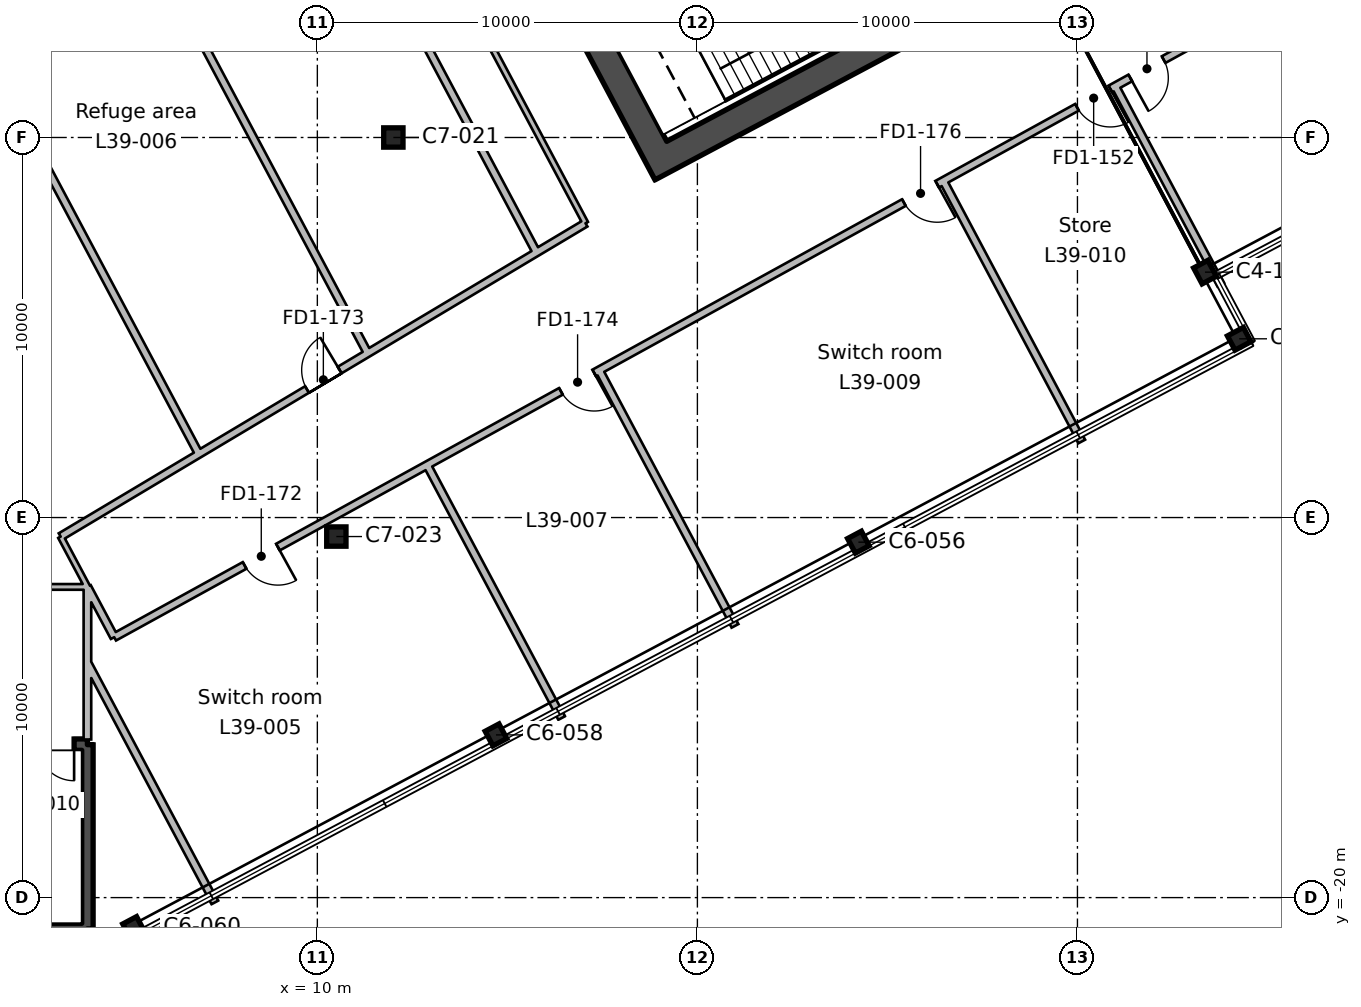
"""IFC4 building model, lengths in metres.
Left out: names, types, materials, properties, quantities, classifications, styles, units other than length and angle.
Written with IfcOpenShell. Run it as: python <this file> out.ifc"""

import sys

from ifc_helpers import new_model, si_unit, direction, frame, frame_2d, origin, origin_2d, place, context, subcontext, project, spatial, rectangle, hollow_rectangle, i_section, extrude, element, fill, save


model = new_model("IFC4")
c1 = context("Model", 3, precision=1e-05, world=origin(), true_north=direction((0.0, 1.0)))
c2 = subcontext(c1, "Body", "Model", "MODEL_VIEW")
j1 = project(units=[si_unit("LENGTHUNIT", "METRE"), si_unit("PLANEANGLEUNIT", "RADIAN")], contexts=[c1])
p1 = place(None, origin())
s1 = spatial("IfcSite", under=j1, at=p1, CompositionType="ELEMENT")
p2 = place(p1, origin())
s2 = spatial("IfcBuilding", under=s1, at=p2, CompositionType="ELEMENT")
p3 = place(p2, frame((0.0, 0.0, 183.6)))
s3 = spatial("IfcBuildingStorey", under=s2, at=p3, CompositionType="ELEMENT", Elevation=183.6)
for number, where, z_axis, x_axis in (
    (1, (5.164, -20.789, 0.0), (0.0, 0.0, 1.0), (0.883, 0.469, 0.0)),
    (2, (14.7, -15.719, 0.0), (0.0, 0.0, 1.0), (0.883, 0.469, 0.0)),
    (3, (24.236, -10.648, 0.0), (0.0, 0.0, 1.0), (0.883, 0.469, 0.0)),
):
    element("IfcColumn", number, at=place(p3, frame(where, z_axis=z_axis, x_axis=x_axis)), inside=s3, PredefinedType="COLUMN", context=c2, shape_type="SweptSolid", body=[
        extrude(i_section(OverallWidth=0.412, OverallDepth=0.434, WebThickness=0.036, FlangeThickness=0.057, FilletRadius=0.015, at=origin_2d()), origin(), (0.0, 0.0, 1.0), 6.0),
    ])
p4 = place(p3, frame((10.5, -10.5, 0.0), z_axis=(0.0, 0.0, 1.0), x_axis=(1.0, 0.0, 0.0)))
e4 = element("IfcColumn", 4, at=p4, inside=s3, PredefinedType="COLUMN", context=c2, shape_type="SweptSolid", body=[
    extrude(hollow_rectangle(XDim=0.508, YDim=0.508, WallThickness=0.012, InnerFilletRadius=0.006, OuterFilletRadius=0.018, at=origin_2d()), origin(), (0.0, 0.0, 1.0), 6.0),
])
for number, where, z_axis, x_axis in (
    (5, (34.256, -5.297, 0.0), (0.0, 0.0, 1.0), (-0.469, 0.883, 0.0)),
    (6, (33.356, -3.543, 0.0), (0.0, 0.0, 1.0), (0.883, 0.469, 0.0)),
):
    element("IfcColumn", number, at=place(p3, frame(where, z_axis=z_axis, x_axis=x_axis)), inside=s3, PredefinedType="COLUMN", context=c2, shape_type="SweptSolid", body=[
        extrude(i_section(OverallWidth=0.424, OverallDepth=0.475, WebThickness=0.048, FlangeThickness=0.077, FilletRadius=0.015, at=origin_2d()), origin(), (0.0, 0.0, 1.0), 6.0),
    ])
p5 = place(p3, frame((12.0, 0.0, 0.0), z_axis=(0.0, 0.0, 1.0), x_axis=(1.0, 0.0, 0.0)))
e7 = element("IfcColumn", 7, at=p5, inside=s3, PredefinedType="COLUMN", context=c2, shape_type="SweptSolid", body=[
    extrude(hollow_rectangle(XDim=0.508, YDim=0.508, WallThickness=0.012, InnerFilletRadius=0.006, OuterFilletRadius=0.018, at=origin_2d()), origin(), (0.0, 0.0, 1.0), 6.0),
])
p6 = place(p3, frame((19.215, -0.939, 0.0), z_axis=(0.0, 0.0, 1.0), x_axis=(-0.469479580143, 0.882943329908, 0.0)))
e8 = element("IfcWall", 8, at=p6, inside=s3, PredefinedType="SHEAR", context=c2, shape_type="SweptSolid", body=[
    extrude(rectangle(XDim=19.7, YDim=0.75, at=frame_2d((9.85, 0.0))), origin(), (0.0, 0.0, 1.0), 6.0),
])
p7 = place(p6, frame((6.85, 0.0, 0.0)))
e9 = element("IfcOpeningElement", 9, at=p7, cuts=e8, PredefinedType="OPENING", context=c2, shape_type="SweptSolid", body=[
    extrude(rectangle(XDim=2.4, YDim=2.4, at=frame_2d((1.2, 1.2))), frame((0.0, 0.385, 0.0), z_axis=(0.0, -1.0, 0.0), x_axis=(1.0, 0.0, 0.0)), (0.0, 0.0, 1.0), 0.77),
])
p8 = place(p3, frame((19.37, -0.432, 0.0), z_axis=(0.0, 0.0, 1.0), x_axis=(0.88294509198, 0.469476266226, 0.0)))
e10 = element("IfcWall", 10, at=p8, inside=s3, PredefinedType="SHEAR", context=c2, shape_type="SweptSolid", body=[
    extrude(rectangle(XDim=20.2, YDim=0.75, at=frame_2d((10.1, 0.0))), origin(), (0.0, 0.0, 1.0), 6.0),
])
p9 = place(p3, frame((3.95, -15.975, 0.0), z_axis=(0.0, 0.0, 1.0), x_axis=(0.0, -1.0, 0.0)))
e11 = element("IfcWall", 11, at=p9, inside=s3, PredefinedType="SHEAR", context=c2, shape_type="SweptSolid", body=[
    extrude(rectangle(XDim=4.85, YDim=0.3, at=frame_2d((2.425, 0.0))), origin(), (0.0, 0.0, 1.0), 6.0),
])
p10 = place(p3, frame((3.95, -20.825, 0.0), z_axis=(0.0, 0.0, 1.0), x_axis=(-1.0, 0.0, 0.0)))
e12 = element("IfcWall", 12, at=p10, inside=s3, PredefinedType="SHEAR", context=c2, shape_type="SweptSolid", body=[
    extrude(rectangle(XDim=8.3, YDim=0.3, at=frame_2d((4.15, 0.0))), origin(), (0.0, 0.0, 1.0), 6.0),
])
p11 = place(p3, frame((-4.35, -15.975, 0.0), z_axis=(0.0, 0.0, 1.0), x_axis=(1.0, 0.0, 0.0)))
e13 = element("IfcWall", 13, at=p11, inside=s3, PredefinedType="SHEAR", context=c2, shape_type="SweptSolid", body=[
    extrude(rectangle(XDim=8.3, YDim=0.3, at=frame_2d((4.15, 0.0))), origin(), (0.0, 0.0, 1.0), 6.0),
])
p12 = place(p11, frame((6.05, 0.0, 0.0)))
e14 = element("IfcOpeningElement", 14, at=p12, cuts=e13, PredefinedType="OPENING", context=c2, shape_type="SweptSolid", body=[
    extrude(rectangle(XDim=1.9, YDim=2.1, at=frame_2d((0.95, 1.05))), frame((0.0, 0.16, 0.0), z_axis=(0.0, -1.0, 0.0), x_axis=(1.0, 0.0, 0.0)), (0.0, 0.0, 1.0), 0.32),
])
p13 = place(p3, frame((3.184, 9.632, 0.0), z_axis=(0.0, 0.0, 1.0), x_axis=(0.469488044355, -0.882938829256, 0.0)))
e15 = element("IfcWall", 15, at=p13, inside=s3, PredefinedType="PARTITIONING", context=c2, shape_type="SweptSolid", body=[
    extrude(rectangle(XDim=17.34, YDim=0.2, at=frame_2d((8.67, 0.0))), origin(), (0.0, 0.0, 1.0), 5.55),
])
p14 = place(p3, frame((6.883, -8.329, 0.0), z_axis=(0.0, 0.0, 1.0), x_axis=(-0.469431608927, 0.882968835543, 0.0)))
e16 = element("IfcWall", 16, at=p14, inside=s3, PredefinedType="PARTITIONING", context=c2, shape_type="SweptSolid", body=[
    extrude(rectangle(XDim=9.02, YDim=0.2, at=frame_2d((4.51, 0.0))), origin(), (0.0, 0.0, 1.0), 5.55),
])
p15 = place(p3, frame((2.647, -11.825, 0.0), z_axis=(0.0, 0.0, 1.0), x_axis=(1.0, 0.0, 0.0)))
e17 = element("IfcWall", 17, at=p15, inside=s3, PredefinedType="PARTITIONING", context=c2, shape_type="SweptSolid", body=[
    extrude(rectangle(XDim=1.303, YDim=0.15, at=frame_2d((0.651, 0.0))), origin(), (0.0, 0.0, 1.0), 5.55),
])
p16 = place(p3, frame((3.95, -11.825, 0.0), z_axis=(0.0, 0.0, 1.0), x_axis=(0.0, -1.0, 0.0)))
e18 = element("IfcWall", 18, at=p16, inside=s3, PredefinedType="PARTITIONING", context=c2, shape_type="SweptSolid", body=[
    extrude(rectangle(XDim=4.015, YDim=0.2, at=frame_2d((2.008, 0.0))), origin(), (0.0, 0.0, 1.0), 5.55),
])
p17 = place(p3, frame((6.812, 13.814, 0.0), z_axis=(0.0, 0.0, 1.0), x_axis=(0.46951956429, -0.882922068333, 0.0)))
e19 = element("IfcWall", 19, at=p17, inside=s3, PredefinedType="PARTITIONING", context=c2, shape_type="SweptSolid", body=[
    extrude(rectangle(XDim=19.073, YDim=0.2, at=frame_2d((9.536, 0.0))), origin(), (0.0, 0.0, 1.0), 5.55),
])
p18 = place(p3, frame((3.951, -11.827, 0.0), z_axis=(0.0, 0.0, 1.0), x_axis=(-0.469381070395, 0.882995702569, 0.0)))
e20 = element("IfcWall", 20, at=p18, inside=s3, PredefinedType="PARTITIONING", context=c2, shape_type="SweptSolid", body=[
    extrude(rectangle(XDim=1.502, YDim=0.15, at=frame_2d((0.751, 0.0))), origin(), (0.0, 0.0, 1.0), 5.55),
])
p19 = place(p3, frame((3.246, -10.501, 0.0), z_axis=(0.0, 0.0, 1.0), x_axis=(0.858642651925, 0.512574673872, 0.0)))
e21 = element("IfcWall", 21, at=p19, inside=s3, PredefinedType="PARTITIONING", context=c2, shape_type="SweptSolid", body=[
    extrude(rectangle(XDim=16.083, YDim=0.2, at=frame_2d((8.042, 0.0))), origin(), (0.0, 0.0, 1.0), 5.55),
])
p20 = place(p19, frame((7.55, 0.0, 0.0)))
e22 = element("IfcOpeningElement", 22, at=p20, cuts=e21, PredefinedType="OPENING", context=c2, shape_type="SweptSolid", body=[
    extrude(rectangle(XDim=1.0, YDim=2.1, at=frame_2d((0.5, 1.05))), frame((0.0, 0.11, 0.0), z_axis=(0.0, -1.0, 0.0), x_axis=(1.0, 0.0, 0.0)), (0.0, 0.0, 1.0), 0.22),
])
p21 = place(p3, frame((17.056, -2.257, 0.0), z_axis=(0.0, 0.0, 1.0), x_axis=(-0.469446756585, 0.882960782103, 0.0)))
e23 = element("IfcWall", 23, at=p21, inside=s3, PredefinedType="PARTITIONING", context=c2, shape_type="SweptSolid", body=[
    extrude(rectangle(XDim=20.0, YDim=0.15, at=frame_2d((10.0, 0.0))), origin(), (0.0, 0.0, 1.0), 5.55),
])
p22 = place(p3, frame((7.304, -20.127, 0.0), z_axis=(0.0, 0.0, 1.0), x_axis=(-0.469420857785, 0.882974551319, 0.0)))
e24 = element("IfcWall", 24, at=p22, inside=s3, PredefinedType="PARTITIONING", context=c2, shape_type="SweptSolid", body=[
    extrude(rectangle(XDim=7.145, YDim=0.2, at=frame_2d((3.573, 0.0))), origin(), (0.0, 0.0, 1.0), 5.55),
])
p23 = place(p3, frame((12.424, -8.873, 0.0), z_axis=(0.0, 0.0, 1.0), x_axis=(-0.876103131237, -0.482123742867, 0.0)))
e25 = element("IfcWall", 25, at=p23, inside=s3, PredefinedType="PARTITIONING", context=c2, shape_type="SweptSolid", body=[
    extrude(rectangle(XDim=8.869, YDim=0.2, at=frame_2d((4.435, 0.0))), origin(), (0.0, 0.0, 1.0), 5.55),
])
p24 = place(p23, frame((3.951, 0.0, 0.0)))
e26 = element("IfcOpeningElement", 26, at=p24, cuts=e25, PredefinedType="OPENING", context=c2, shape_type="SweptSolid", body=[
    extrude(rectangle(XDim=1.0, YDim=2.1, at=frame_2d((0.5, 1.05))), frame((0.0, 0.11, 0.0), z_axis=(0.0, -1.0, 0.0), x_axis=(1.0, 0.0, 0.0)), (0.0, 0.0, 1.0), 0.22),
])
p25 = place(p3, frame((3.951, -11.827, 0.0), z_axis=(0.0, 0.0, 1.0), x_axis=(0.470080557323, -0.882623515224, 0.0)))
e27 = element("IfcWall", 27, at=p25, inside=s3, PredefinedType="PARTITIONING", context=c2, shape_type="SweptSolid", body=[
    extrude(rectangle(XDim=1.498, YDim=0.2, at=frame_2d((0.749, 0.0))), origin(), (0.0, 0.0, 1.0), 5.55),
])
p26 = place(p3, frame((12.888, -8.617, 0.0), z_axis=(0.0, 0.0, 1.0), x_axis=(0.469566260547, -0.882897234652, 0.0)))
e28 = element("IfcWall", 28, at=p26, inside=s3, PredefinedType="PARTITIONING", context=c2, shape_type="SweptSolid", body=[
    extrude(rectangle(XDim=7.541, YDim=0.2, at=frame_2d((3.771, 0.0))), origin(), (0.0, 0.0, 1.0), 5.55),
])
p27 = place(p3, frame((48.518, 10.994, 0.0), z_axis=(0.0, 0.0, 1.0), x_axis=(-0.876059599613, -0.482202838986, 0.0)))
e29 = element("IfcWall", 29, at=p27, inside=s3, PredefinedType="PARTITIONING", context=c2, shape_type="SweptSolid", body=[
    extrude(rectangle(XDim=41.2, YDim=0.2, at=frame_2d((20.6, 0.0))), origin(), (0.0, 0.0, 1.0), 5.55),
])
p28 = place(p27, frame((35.651, 0.0, 0.0)))
e30 = element("IfcOpeningElement", 30, at=p28, cuts=e29, PredefinedType="OPENING", context=c2, shape_type="SweptSolid", body=[
    extrude(rectangle(XDim=1.0, YDim=2.1, at=frame_2d((0.5, 1.05))), frame((0.0, 0.11, 0.0), z_axis=(0.0, -1.0, 0.0), x_axis=(1.0, 0.0, 0.0)), (0.0, 0.0, 1.0), 0.22),
])
p29 = place(p27, frame((25.35, 0.0, 0.0)))
e31 = element("IfcOpeningElement", 31, at=p29, cuts=e29, PredefinedType="OPENING", context=c2, shape_type="SweptSolid", body=[
    extrude(rectangle(XDim=1.0, YDim=2.1, at=frame_2d((0.5, 1.05))), frame((0.0, 0.11, 0.0), z_axis=(0.0, -1.0, 0.0), x_axis=(1.0, 0.0, 0.0)), (0.0, 0.0, 1.0), 0.22),
])
p30 = place(p27, frame((20.151, 0.0, 0.0)))
e32 = element("IfcOpeningElement", 32, at=p30, cuts=e29, PredefinedType="OPENING", context=c2, shape_type="SweptSolid", body=[
    extrude(rectangle(XDim=1.0, YDim=2.1, at=frame_2d((0.5, 1.05))), frame((0.0, 0.11, 0.0), z_axis=(0.0, -1.0, 0.0), x_axis=(1.0, 0.0, 0.0)), (0.0, 0.0, 1.0), 0.22),
])
p31 = place(p27, frame((18.55, 0.0, 0.0)))
e33 = element("IfcOpeningElement", 33, at=p31, cuts=e29, PredefinedType="OPENING", context=c2, shape_type="SweptSolid", body=[
    extrude(rectangle(XDim=1.0, YDim=2.1, at=frame_2d((0.5, 1.05))), frame((0.0, 0.11, 0.0), z_axis=(0.0, -1.0, 0.0), x_axis=(1.0, 0.0, 0.0)), (0.0, 0.0, 1.0), 0.22),
])
p32 = place(p3, frame((17.415, -6.126, 0.0), z_axis=(0.0, 0.0, 1.0), x_axis=(0.46943804269, -0.882965414994, 0.0)))
e34 = element("IfcWall", 34, at=p32, inside=s3, PredefinedType="PARTITIONING", context=c2, shape_type="SweptSolid", body=[
    extrude(rectangle(XDim=7.615, YDim=0.2, at=frame_2d((3.808, 0.0))), origin(), (0.0, 0.0, 1.0), 5.55),
])
p33 = place(p3, frame((26.468, -1.143, 0.0), z_axis=(0.0, 0.0, 1.0), x_axis=(0.469435669849, -0.882966676536, 0.0)))
e35 = element("IfcWall", 35, at=p33, inside=s3, PredefinedType="PARTITIONING", context=c2, shape_type="SweptSolid", body=[
    extrude(rectangle(XDim=7.765, YDim=0.2, at=frame_2d((3.882, 0.0))), origin(), (0.0, 0.0, 1.0), 5.55),
])
p34 = place(p3, frame((30.995, 1.349, 0.0), z_axis=(0.0, 0.0, 1.0), x_axis=(0.469470734434, -0.882948033301, 0.0)))
e36 = element("IfcWall", 36, at=p34, inside=s3, PredefinedType="PARTITIONING", context=c2, shape_type="SweptSolid", body=[
    extrude(rectangle(XDim=5.921, YDim=0.2, at=frame_2d((2.96, 0.0))), origin(), (0.0, 0.0, 1.0), 5.55),
])
p35 = place(p12, frame((1.9, 0.0, 0.0), z_axis=(0.0, 0.0, 1.0), x_axis=(-1.0, 0.0, 0.0)))
e37 = element("IfcDoor", 37, at=p35, inside=s3, OperationType="DOUBLE_DOOR_SINGLE_SWING", PredefinedType="DOOR", context=c2, shape_type="SweptSolid", body=[
    extrude(rectangle(XDim=1.9, YDim=2.1, at=frame_2d((0.95, 1.05))), frame((0.0, 0.025, 0.0), z_axis=(0.0, -1.0, 0.0), x_axis=(1.0, 0.0, 0.0)), (0.0, 0.0, 1.0), 0.05),
])
fill(e14, e37)
p36 = place(p24, origin())
e38 = element("IfcDoor", 38, at=p36, inside=s3, OperationType="SINGLE_SWING_LEFT", PredefinedType="DOOR", context=c2, shape_type="SweptSolid", body=[
    extrude(rectangle(XDim=1.0, YDim=2.1, at=frame_2d((0.5, 1.05))), frame((0.0, 0.025, 0.0), z_axis=(0.0, -1.0, 0.0), x_axis=(1.0, 0.0, 0.0)), (0.0, 0.0, 1.0), 0.05),
])
fill(e26, e38)
p37 = place(p20, origin())
e39 = element("IfcDoor", 39, at=p37, inside=s3, OperationType="SINGLE_SWING_RIGHT", PredefinedType="DOOR", context=c2, shape_type="SweptSolid", body=[
    extrude(rectangle(XDim=1.0, YDim=2.1, at=frame_2d((0.5, 1.05))), frame((0.0, 0.025, 0.0), z_axis=(0.0, -1.0, 0.0), x_axis=(1.0, 0.0, 0.0)), (0.0, 0.0, 1.0), 0.05),
])
fill(e22, e39)
p38 = place(p28, origin())
e40 = element("IfcDoor", 40, at=p38, inside=s3, OperationType="SINGLE_SWING_LEFT", PredefinedType="DOOR", context=c2, shape_type="SweptSolid", body=[
    extrude(rectangle(XDim=1.0, YDim=2.1, at=frame_2d((0.5, 1.05))), frame((0.0, 0.025, 0.0), z_axis=(0.0, -1.0, 0.0), x_axis=(1.0, 0.0, 0.0)), (0.0, 0.0, 1.0), 0.05),
])
fill(e30, e40)
p39 = place(p29, origin())
e41 = element("IfcDoor", 41, at=p39, inside=s3, OperationType="SINGLE_SWING_LEFT", PredefinedType="DOOR", context=c2, shape_type="SweptSolid", body=[
    extrude(rectangle(XDim=1.0, YDim=2.1, at=frame_2d((0.5, 1.05))), frame((0.0, 0.025, 0.0), z_axis=(0.0, -1.0, 0.0), x_axis=(1.0, 0.0, 0.0)), (0.0, 0.0, 1.0), 0.05),
])
fill(e31, e41)
p40 = place(p30, origin())
e42 = element("IfcDoor", 42, at=p40, inside=s3, OperationType="SINGLE_SWING_LEFT", PredefinedType="DOOR", context=c2, shape_type="SweptSolid", body=[
    extrude(rectangle(XDim=1.0, YDim=2.1, at=frame_2d((0.5, 1.05))), frame((0.0, 0.025, 0.0), z_axis=(0.0, -1.0, 0.0), x_axis=(1.0, 0.0, 0.0)), (0.0, 0.0, 1.0), 0.05),
])
fill(e32, e42)
p41 = place(p31, origin())
e43 = element("IfcDoor", 43, at=p41, inside=s3, OperationType="SINGLE_SWING_RIGHT", PredefinedType="DOOR", context=c2, shape_type="SweptSolid", body=[
    extrude(rectangle(XDim=1.0, YDim=2.1, at=frame_2d((0.5, 1.05))), frame((0.0, 0.025, 0.0), z_axis=(0.0, -1.0, 0.0), x_axis=(1.0, 0.0, 0.0)), (0.0, 0.0, 1.0), 0.05),
])
fill(e33, e43)
save(model, sys.argv[1])
